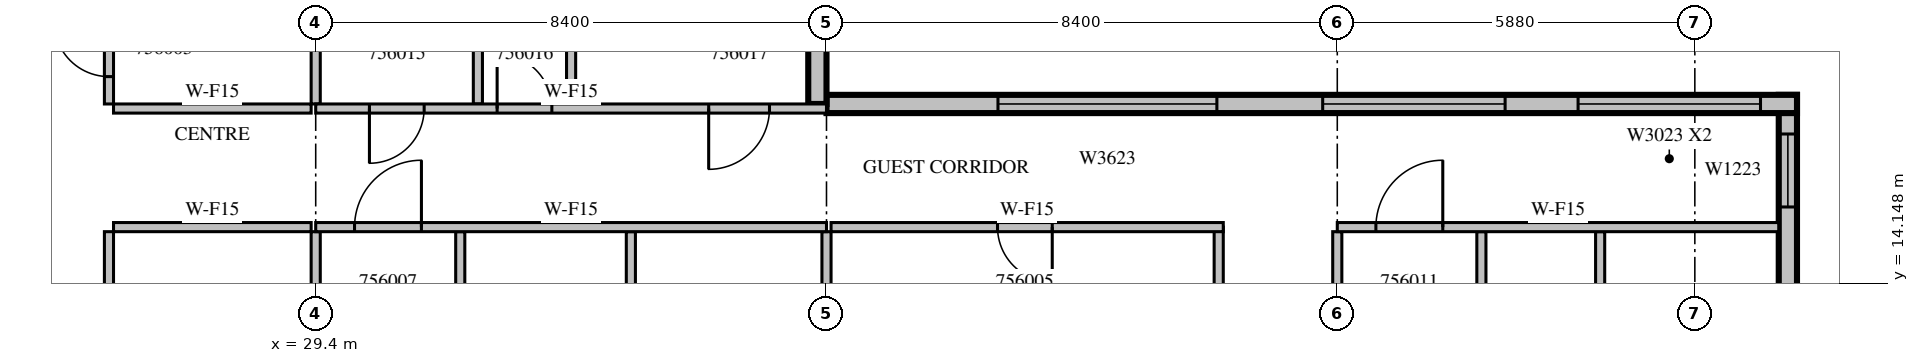
"""IFC4 building model, lengths in metres.
Left out: names, types, materials, properties, quantities, classifications, styles, units other than length and angle.
Written with IfcOpenShell. Run it as: python <this file> out.ifc"""

import sys

from ifc_helpers import new_model, si_unit, direction, frame, frame_2d, origin, place, context, subcontext, project, spatial, rectangle, extrude, source, transform, mapped, element, fill, save


model = new_model("IFC4")
c1 = context("Model", 3, precision=1e-05, world=origin(), true_north=direction((0.0, 1.0)))
c2 = subcontext(c1, "Body", "Model", "MODEL_VIEW")
j1 = project(units=[si_unit("LENGTHUNIT", "METRE"), si_unit("PLANEANGLEUNIT", "RADIAN")], contexts=[c1])
p1 = place(None, origin())
s1 = spatial("IfcSite", under=j1, at=p1, CompositionType="ELEMENT")
p2 = place(p1, origin())
s2 = spatial("IfcBuilding", under=s1, at=p2, CompositionType="ELEMENT")
p3 = place(p2, frame((0.0, 0.0, 246.2)))
s3 = spatial("IfcBuildingStorey", under=s2, at=p3, CompositionType="ELEMENT", Elevation=246.2)
m1 = source(origin(), c2, "Body", "SweptSolid", [
    extrude(rectangle(XDim=3.375, YDim=0.3, at=frame_2d((1.688, 0.0))), origin(), (0.0, 0.0, 1.0), 3.4),
])
p4 = place(p3, frame((53.61, 13.875, 0.0), z_axis=(0.0, 0.0, 1.0), x_axis=(0.0, 1.0, 0.0)))
e1 = element("IfcWall", 1, at=p4, inside=s3, PredefinedType="STANDARD", context=c2, shape_type="MappedRepresentation", body=[
    mapped(m1, transform((0.0, 0.0, 0.0), scale=1.0)),
])
m2 = source(origin(), c2, "Body", "SweptSolid", [
    extrude(rectangle(XDim=1.2, YDim=2.3, at=frame_2d((0.6, 1.15))), frame((0.0, 0.16, 0.0), z_axis=(0.0, -1.0, 0.0), x_axis=(1.0, 0.0, 0.0)), (0.0, 0.0, 1.0), 0.32),
])
p5 = place(p4, frame((1.531, 0.0, 0.6)))
e2 = element("IfcOpeningElement", 2, at=p5, cuts=e1, PredefinedType="OPENING", context=c2, shape_type="MappedRepresentation", body=[
    mapped(m2, transform((0.0, 0.0, 0.0), scale=1.0)),
])
m3 = source(origin(), c2, "Body", "SweptSolid", [
    extrude(rectangle(XDim=15.96, YDim=0.3, at=frame_2d((7.98, 0.0))), origin(), (0.0, 0.0, 1.0), 3.4),
])
p6 = place(p3, frame((53.76, 17.1, 0.0), z_axis=(0.0, 0.0, 1.0), x_axis=(-1.0, 0.0, 0.0)))
e3 = element("IfcWall", 3, at=p6, inside=s3, PredefinedType="STANDARD", context=c2, shape_type="MappedRepresentation", body=[
    mapped(m3, transform((0.0, 0.0, 0.0), scale=1.0)),
])
m4 = source(origin(), c2, "Body", "SweptSolid", [
    extrude(rectangle(XDim=3.0, YDim=2.3, at=frame_2d((1.5, 1.15))), frame((0.0, 0.16, 0.0), z_axis=(0.0, -1.0, 0.0), x_axis=(1.0, 0.0, 0.0)), (0.0, 0.0, 1.0), 0.32),
])
p7 = place(p6, frame((0.6, 0.0, 0.6)))
e4 = element("IfcOpeningElement", 4, at=p7, cuts=e3, PredefinedType="OPENING", context=c2, shape_type="MappedRepresentation", body=[
    mapped(m4, transform((0.0, 0.0, 0.0), scale=1.0)),
])
p8 = place(p6, frame((4.8, 0.0, 0.6)))
e5 = element("IfcOpeningElement", 5, at=p8, cuts=e3, PredefinedType="OPENING", context=c2, shape_type="MappedRepresentation", body=[
    mapped(m4, transform((0.0, 0.0, 0.0), scale=1.0)),
])
m5 = source(origin(), c2, "Body", "SweptSolid", [
    extrude(rectangle(XDim=3.6, YDim=2.3, at=frame_2d((1.8, 1.15))), frame((0.0, 0.16, 0.0), z_axis=(0.0, -1.0, 0.0), x_axis=(1.0, 0.0, 0.0)), (0.0, 0.0, 1.0), 0.32),
])
p9 = place(p6, frame((9.54, 0.0, 0.6)))
e6 = element("IfcOpeningElement", 6, at=p9, cuts=e3, PredefinedType="OPENING", context=c2, shape_type="MappedRepresentation", body=[
    mapped(m5, transform((0.0, 0.0, 0.0), scale=1.0)),
])
m6 = source(origin(), c2, "Body", "SweptSolid", [
    extrude(rectangle(XDim=3.1, YDim=0.3, at=frame_2d((1.55, 0.0))), origin(), (0.0, 0.0, 1.0), 3.4),
])
p10 = place(p3, frame((37.65, 17.1, 0.0), z_axis=(0.0, 0.0, 1.0), x_axis=(0.0, 1.0, 0.0)))
e7 = element("IfcWall", 7, at=p10, inside=s3, PredefinedType="STANDARD", context=c2, shape_type="MappedRepresentation", body=[
    mapped(m6, transform((0.0, 0.0, 0.0), scale=1.0)),
])
m7 = source(origin(), c2, "Body", "SweptSolid", [
    extrude(rectangle(XDim=1.8, YDim=2.3, at=frame_2d((0.9, 1.15))), frame((0.0, 0.16, 0.0), z_axis=(0.0, -1.0, 0.0), x_axis=(1.0, 0.0, 0.0)), (0.0, 0.0, 1.0), 0.32),
])
p11 = place(p10, frame((1.125, 0.0, 0.6)))
e8 = element("IfcOpeningElement", 8, at=p11, cuts=e7, PredefinedType="OPENING", context=c2, shape_type="MappedRepresentation", body=[
    mapped(m7, transform((0.0, 0.0, 0.0), scale=1.0)),
])
m8 = source(origin(), c2, "Body", "SweptSolid", [
    extrude(rectangle(XDim=11.525, YDim=0.15, at=frame_2d((5.763, 0.0))), origin(), (0.0, 0.0, 1.0), 3.4),
])
p12 = place(p3, frame((26.0, 15.0, 0.0), z_axis=(0.0, 0.0, 1.0), x_axis=(0.0, -1.0, 0.0)))
e9 = element("IfcWall", 9, at=p12, inside=s3, PredefinedType="PARTITIONING", context=c2, shape_type="MappedRepresentation", body=[
    mapped(m8, transform((0.0, 0.0, 0.0), scale=1.0)),
])
m9 = source(origin(), c2, "Body", "SweptSolid", [
    extrude(rectangle(XDim=0.9, YDim=2.1, at=frame_2d((0.45, 1.05))), frame((0.0, 0.085, 0.0), z_axis=(0.0, -1.0, 0.0), x_axis=(1.0, 0.0, 0.0)), (0.0, 0.0, 1.0), 0.17),
])
p13 = place(p12, frame((8.162, 0.0, 0.0)))
e10 = element("IfcOpeningElement", 10, at=p13, cuts=e9, PredefinedType="OPENING", context=c2, shape_type="MappedRepresentation", body=[
    mapped(m9, transform((0.0, 0.0, 0.0), scale=1.0)),
])
p14 = place(p12, frame((1.525, 0.0, 0.0)))
e11 = element("IfcOpeningElement", 11, at=p14, cuts=e9, PredefinedType="OPENING", context=c2, shape_type="MappedRepresentation", body=[
    mapped(m9, transform((0.0, 0.0, 0.0), scale=1.0)),
])
m10 = source(origin(), c2, "Body", "SweptSolid", [
    extrude(rectangle(XDim=3.6, YDim=0.15, at=frame_2d((1.8, 0.0))), origin(), (0.0, 0.0, 1.0), 3.4),
])
p15 = place(p3, frame((26.0, 20.7, 0.0), z_axis=(0.0, 0.0, 1.0), x_axis=(0.0, -1.0, 0.0)))
e12 = element("IfcWall", 12, at=p15, inside=s3, PredefinedType="PARTITIONING", context=c2, shape_type="MappedRepresentation", body=[
    mapped(m10, transform((0.0, 0.0, 0.0), scale=1.0)),
])
p16 = place(p15, frame((2.25, 0.0, 0.0)))
e13 = element("IfcOpeningElement", 13, at=p16, cuts=e12, PredefinedType="OPENING", context=c2, shape_type="MappedRepresentation", body=[
    mapped(m9, transform((0.0, 0.0, 0.0), scale=1.0)),
])
m11 = source(origin(), c2, "Body", "SweptSolid", [
    extrude(rectangle(XDim=3.25, YDim=0.15, at=frame_2d((1.625, 0.0))), origin(), (0.0, 0.0, 1.0), 3.4),
])
for number, where, z_axis, x_axis in (
    (14, (29.325, 15.075, 0.0), (0.0, 0.0, 1.0), (-1.0, 0.0, 0.0)),
    (15, (26.075, 17.025, 0.0), (0.0, 0.0, 1.0), (1.0, 0.0, 0.0)),
):
    element("IfcWall", number, at=place(p3, frame(where, z_axis=z_axis, x_axis=x_axis)), inside=s3, PredefinedType="PARTITIONING", context=c2, shape_type="MappedRepresentation", body=[
        mapped(m11, transform((0.0, 0.0, 0.0), scale=1.0)),
    ])
m12 = source(origin(), c2, "Body", "SweptSolid", [
    extrude(rectangle(XDim=4.101, YDim=0.15, at=frame_2d((2.05, 0.0))), origin(), (0.0, 0.0, 1.0), 3.4),
])
p17 = place(p3, frame((29.4, 10.899, 0.0), z_axis=(0.0, 0.0, 1.0), x_axis=(0.0, 1.0, 0.0)))
e16 = element("IfcWall", 16, at=p17, inside=s3, PredefinedType="PARTITIONING", context=c2, shape_type="MappedRepresentation", body=[
    mapped(m12, transform((0.0, 0.0, 0.0), scale=1.0)),
])
m13 = source(origin(), c2, "Body", "SweptSolid", [
    extrude(rectangle(XDim=3.101, YDim=0.15, at=frame_2d((1.55, 0.0))), origin(), (0.0, 0.0, 1.0), 3.4),
])
p18 = place(p3, frame((29.4, 17.1, 0.0), z_axis=(0.0, 0.0, 1.0), x_axis=(0.0, 1.0, 0.0)))
e17 = element("IfcWall", 17, at=p18, inside=s3, PredefinedType="PARTITIONING", context=c2, shape_type="MappedRepresentation", body=[
    mapped(m13, transform((0.0, 0.0, 0.0), scale=1.0)),
])
m14 = source(origin(), c2, "Body", "SweptSolid", [
    extrude(rectangle(XDim=3.575, YDim=0.15, at=frame_2d((1.788, 0.0))), origin(), (0.0, 0.0, 1.0), 3.4),
])
p19 = place(p3, frame((44.25, 11.5, 0.0), z_axis=(0.0, 0.0, 1.0), x_axis=(0.0, 1.0, 0.0)))
e18 = element("IfcWall", 18, at=p19, inside=s3, PredefinedType="PARTITIONING", context=c2, shape_type="MappedRepresentation", body=[
    mapped(m14, transform((0.0, 0.0, 0.0), scale=1.0)),
])
m15 = source(origin(), c2, "Body", "SweptSolid", [
    extrude(rectangle(XDim=6.45, YDim=0.15, at=frame_2d((3.225, 0.0))), origin(), (0.0, 0.0, 1.0), 3.4),
])
p20 = place(p3, frame((44.325, 15.075, 0.0), z_axis=(0.0, 0.0, 1.0), x_axis=(-1.0, 0.0, 0.0)))
e19 = element("IfcWall", 19, at=p20, inside=s3, PredefinedType="PARTITIONING", context=c2, shape_type="MappedRepresentation", body=[
    mapped(m15, transform((0.0, 0.0, 0.0), scale=1.0)),
])
p21 = place(p20, frame((2.812, 0.0, 0.0)))
e20 = element("IfcOpeningElement", 20, at=p21, cuts=e19, PredefinedType="OPENING", context=c2, shape_type="MappedRepresentation", body=[
    mapped(m9, transform((0.0, 0.0, 0.0), scale=1.0)),
])
m16 = source(origin(), c2, "Body", "SweptSolid", [
    extrude(rectangle(XDim=3.95, YDim=0.15, at=frame_2d((1.975, 0.0))), origin(), (0.0, 0.0, 1.0), 3.4),
])
for number, where, z_axis, x_axis in (
    (21, (31.777, 11.05, 0.0), (0.0, 0.0, 1.0), (0.0, 1.0, 0.0)),
    (22, (34.583, 11.05, 0.0), (0.0, 0.0, 1.0), (0.0, 1.0, 0.0)),
    (23, (37.8, 11.05, 0.0), (0.0, 0.0, 1.0), (0.0, 1.0, 0.0)),
    (24, (48.57, 11.05, 0.0), (0.0, 0.0, 1.0), (0.0, 1.0, 0.0)),
    (25, (50.523, 11.05, 0.0), (0.0, 0.0, 1.0), (0.0, 1.0, 0.0)),
    (26, (46.2, 11.05, 0.0), (0.0, 0.0, 1.0), (0.0, 1.0, 0.0)),
):
    element("IfcWall", number, at=place(p3, frame(where, z_axis=z_axis, x_axis=x_axis)), inside=s3, PredefinedType="PARTITIONING", context=c2, shape_type="MappedRepresentation", body=[
        mapped(m16, transform((0.0, 0.0, 0.0), scale=1.0)),
    ])
for number, where, z_axis, x_axis in (
    (27, (32.067, 20.7, 0.0), (0.0, 0.0, 1.0), (0.0, -1.0, 0.0)),
    (28, (33.6, 17.1, 0.0), (0.0, 0.0, 1.0), (0.0, 1.0, 0.0)),
):
    element("IfcWall", number, at=place(p3, frame(where, z_axis=z_axis, x_axis=x_axis)), inside=s3, PredefinedType="PARTITIONING", context=c2, shape_type="MappedRepresentation", body=[
        mapped(m10, transform((0.0, 0.0, 0.0), scale=1.0)),
    ])
m17 = source(origin(), c2, "Body", "SweptSolid", [
    extrude(rectangle(XDim=8.4, YDim=0.15, at=frame_2d((4.2, 0.0))), origin(), (0.0, 0.0, 1.0), 3.4),
])
p22 = place(p3, frame((37.8, 15.075, 0.0), z_axis=(0.0, 0.0, 1.0), x_axis=(-1.0, 0.0, 0.0)))
e29 = element("IfcWall", 29, at=p22, inside=s3, PredefinedType="PARTITIONING", context=c2, shape_type="MappedRepresentation", body=[
    mapped(m17, transform((0.0, 0.0, 0.0), scale=1.0)),
])
m18 = source(origin(), c2, "Body", "SweptSolid", [
    extrude(rectangle(XDim=1.1, YDim=2.1, at=frame_2d((0.55, 1.05))), frame((0.0, 0.085, 0.0), z_axis=(0.0, -1.0, 0.0), x_axis=(1.0, 0.0, 0.0)), (0.0, 0.0, 1.0), 0.17),
])
p23 = place(p22, frame((6.662, 0.0, 0.0)))
e30 = element("IfcOpeningElement", 30, at=p23, cuts=e29, PredefinedType="OPENING", context=c2, shape_type="MappedRepresentation", body=[
    mapped(m18, transform((0.0, 0.0, 0.0), scale=1.0)),
])
m19 = source(origin(), c2, "Body", "SweptSolid", [
    extrude(rectangle(XDim=7.26, YDim=0.15, at=frame_2d((3.63, 0.0))), origin(), (0.0, 0.0, 1.0), 3.4),
])
p24 = place(p3, frame((53.46, 15.075, 0.0), z_axis=(0.0, 0.0, 1.0), x_axis=(-1.0, 0.0, 0.0)))
e31 = element("IfcWall", 31, at=p24, inside=s3, PredefinedType="PARTITIONING", context=c2, shape_type="MappedRepresentation", body=[
    mapped(m19, transform((0.0, 0.0, 0.0), scale=1.0)),
])
p25 = place(p24, frame((5.525, 0.0, 0.0)))
e32 = element("IfcOpeningElement", 32, at=p25, cuts=e31, PredefinedType="OPENING", context=c2, shape_type="MappedRepresentation", body=[
    mapped(m18, transform((0.0, 0.0, 0.0), scale=1.0)),
])
p26 = place(p3, frame((29.4, 17.025, 0.0), z_axis=(0.0, 0.0, 1.0), x_axis=(1.0, 0.0, 0.0)))
e33 = element("IfcWall", 33, at=p26, inside=s3, PredefinedType="PARTITIONING", context=c2, shape_type="MappedRepresentation", body=[
    mapped(m17, transform((0.0, 0.0, 0.0), scale=1.0)),
])
p27 = place(p26, frame((0.883, 0.0, 0.0)))
e34 = element("IfcOpeningElement", 34, at=p27, cuts=e33, PredefinedType="OPENING", context=c2, shape_type="MappedRepresentation", body=[
    mapped(m9, transform((0.0, 0.0, 0.0), scale=1.0)),
])
p28 = place(p26, frame((2.983, 0.0, 0.0)))
e35 = element("IfcOpeningElement", 35, at=p28, cuts=e33, PredefinedType="OPENING", context=c2, shape_type="MappedRepresentation", body=[
    mapped(m9, transform((0.0, 0.0, 0.0), scale=1.0)),
])
m20 = source(origin(), c2, "Body", "SweptSolid", [
    extrude(rectangle(XDim=1.0, YDim=2.1, at=frame_2d((0.5, 1.05))), frame((0.0, 0.085, 0.0), z_axis=(0.0, -1.0, 0.0), x_axis=(1.0, 0.0, 0.0)), (0.0, 0.0, 1.0), 0.17),
])
p29 = place(p26, frame((6.463, 0.0, 0.0)))
e36 = element("IfcOpeningElement", 36, at=p29, cuts=e33, PredefinedType="OPENING", context=c2, shape_type="MappedRepresentation", body=[
    mapped(m20, transform((0.0, 0.0, 0.0), scale=1.0)),
])
m21 = source(origin(), c2, "Body", "SweptSolid", [
    extrude(rectangle(XDim=1.2, YDim=2.3, at=frame_2d((0.6, 1.15))), frame((0.0, 0.03, 0.0), z_axis=(0.0, -1.0, 0.0), x_axis=(1.0, 0.0, 0.0)), (0.0, 0.0, 1.0), 0.06),
])
p30 = place(p5, origin())
e37 = element("IfcWindow", 37, at=p30, inside=s3, PartitioningType="SINGLE_PANEL", PredefinedType="WINDOW", context=c2, shape_type="MappedRepresentation", body=[
    mapped(m21, transform((0.0, 0.0, 0.0), scale=1.0)),
])
fill(e2, e37)
m22 = source(origin(), c2, "Body", "SweptSolid", [
    extrude(rectangle(XDim=3.0, YDim=2.3, at=frame_2d((1.5, 1.15))), frame((0.0, 0.03, 0.0), z_axis=(0.0, -1.0, 0.0), x_axis=(1.0, 0.0, 0.0)), (0.0, 0.0, 1.0), 0.06),
])
p31 = place(p7, origin())
e38 = element("IfcWindow", 38, at=p31, inside=s3, PartitioningType="SINGLE_PANEL", PredefinedType="WINDOW", context=c2, shape_type="MappedRepresentation", body=[
    mapped(m22, transform((0.0, 0.0, 0.0), scale=1.0)),
])
fill(e4, e38)
p32 = place(p8, origin())
e39 = element("IfcWindow", 39, at=p32, inside=s3, PartitioningType="SINGLE_PANEL", PredefinedType="WINDOW", context=c2, shape_type="MappedRepresentation", body=[
    mapped(m22, transform((0.0, 0.0, 0.0), scale=1.0)),
])
fill(e5, e39)
m23 = source(origin(), c2, "Body", "SweptSolid", [
    extrude(rectangle(XDim=3.6, YDim=2.3, at=frame_2d((1.8, 1.15))), frame((0.0, 0.03, 0.0), z_axis=(0.0, -1.0, 0.0), x_axis=(1.0, 0.0, 0.0)), (0.0, 0.0, 1.0), 0.06),
])
p33 = place(p9, origin())
e40 = element("IfcWindow", 40, at=p33, inside=s3, PartitioningType="SINGLE_PANEL", PredefinedType="WINDOW", context=c2, shape_type="MappedRepresentation", body=[
    mapped(m23, transform((0.0, 0.0, 0.0), scale=1.0)),
])
fill(e6, e40)
m24 = source(origin(), c2, "Body", "SweptSolid", [
    extrude(rectangle(XDim=0.9, YDim=2.1, at=frame_2d((0.45, 1.05))), frame((0.0, 0.025, 0.0), z_axis=(0.0, -1.0, 0.0), x_axis=(1.0, 0.0, 0.0)), (0.0, 0.0, 1.0), 0.05),
])
p34 = place(p16, origin())
e41 = element("IfcDoor", 41, at=p34, inside=s3, OperationType="SINGLE_SWING_RIGHT", PredefinedType="DOOR", context=c2, shape_type="MappedRepresentation", body=[
    mapped(m24, transform((0.0, 0.0, 0.0), scale=1.0)),
])
fill(e13, e41)
p35 = place(p21, origin())
e42 = element("IfcDoor", 42, at=p35, inside=s3, OperationType="SINGLE_SWING_LEFT", PredefinedType="DOOR", context=c2, shape_type="MappedRepresentation", body=[
    mapped(m24, transform((0.0, 0.0, 0.0), scale=1.0)),
])
fill(e20, e42)
m25 = source(origin(), c2, "Body", "SweptSolid", [
    extrude(rectangle(XDim=1.1, YDim=2.1, at=frame_2d((0.55, 1.05))), frame((0.0, 0.025, 0.0), z_axis=(0.0, -1.0, 0.0), x_axis=(1.0, 0.0, 0.0)), (0.0, 0.0, 1.0), 0.05),
])
p36 = place(p23, origin())
e43 = element("IfcDoor", 43, at=p36, inside=s3, OperationType="SINGLE_SWING_RIGHT", PredefinedType="DOOR", context=c2, shape_type="MappedRepresentation", body=[
    mapped(m25, transform((0.0, 0.0, 0.0), scale=1.0)),
])
fill(e30, e43)
p37 = place(p25, origin())
e44 = element("IfcDoor", 44, at=p37, inside=s3, OperationType="SINGLE_SWING_RIGHT", PredefinedType="DOOR", context=c2, shape_type="MappedRepresentation", body=[
    mapped(m25, transform((0.0, 0.0, 0.0), scale=1.0)),
])
fill(e32, e44)
p38 = place(p27, origin())
e45 = element("IfcDoor", 45, at=p38, inside=s3, OperationType="SINGLE_SWING_RIGHT", PredefinedType="DOOR", context=c2, shape_type="MappedRepresentation", body=[
    mapped(m24, transform((0.0, 0.0, 0.0), scale=1.0)),
])
fill(e34, e45)
p39 = place(p28, origin())
e46 = element("IfcDoor", 46, at=p39, inside=s3, OperationType="SINGLE_SWING_LEFT", PredefinedType="DOOR", context=c2, shape_type="MappedRepresentation", body=[
    mapped(m24, transform((0.0, 0.0, 0.0), scale=1.0)),
])
fill(e35, e46)
m26 = source(origin(), c2, "Body", "SweptSolid", [
    extrude(rectangle(XDim=1.0, YDim=2.1, at=frame_2d((0.5, 1.05))), frame((0.0, 0.025, 0.0), z_axis=(0.0, -1.0, 0.0), x_axis=(1.0, 0.0, 0.0)), (0.0, 0.0, 1.0), 0.05),
])
p40 = place(p29, origin())
e47 = element("IfcDoor", 47, at=p40, inside=s3, OperationType="SINGLE_SWING_RIGHT", PredefinedType="DOOR", context=c2, shape_type="MappedRepresentation", body=[
    mapped(m26, transform((0.0, 0.0, 0.0), scale=1.0)),
])
fill(e36, e47)
save(model, sys.argv[1])
